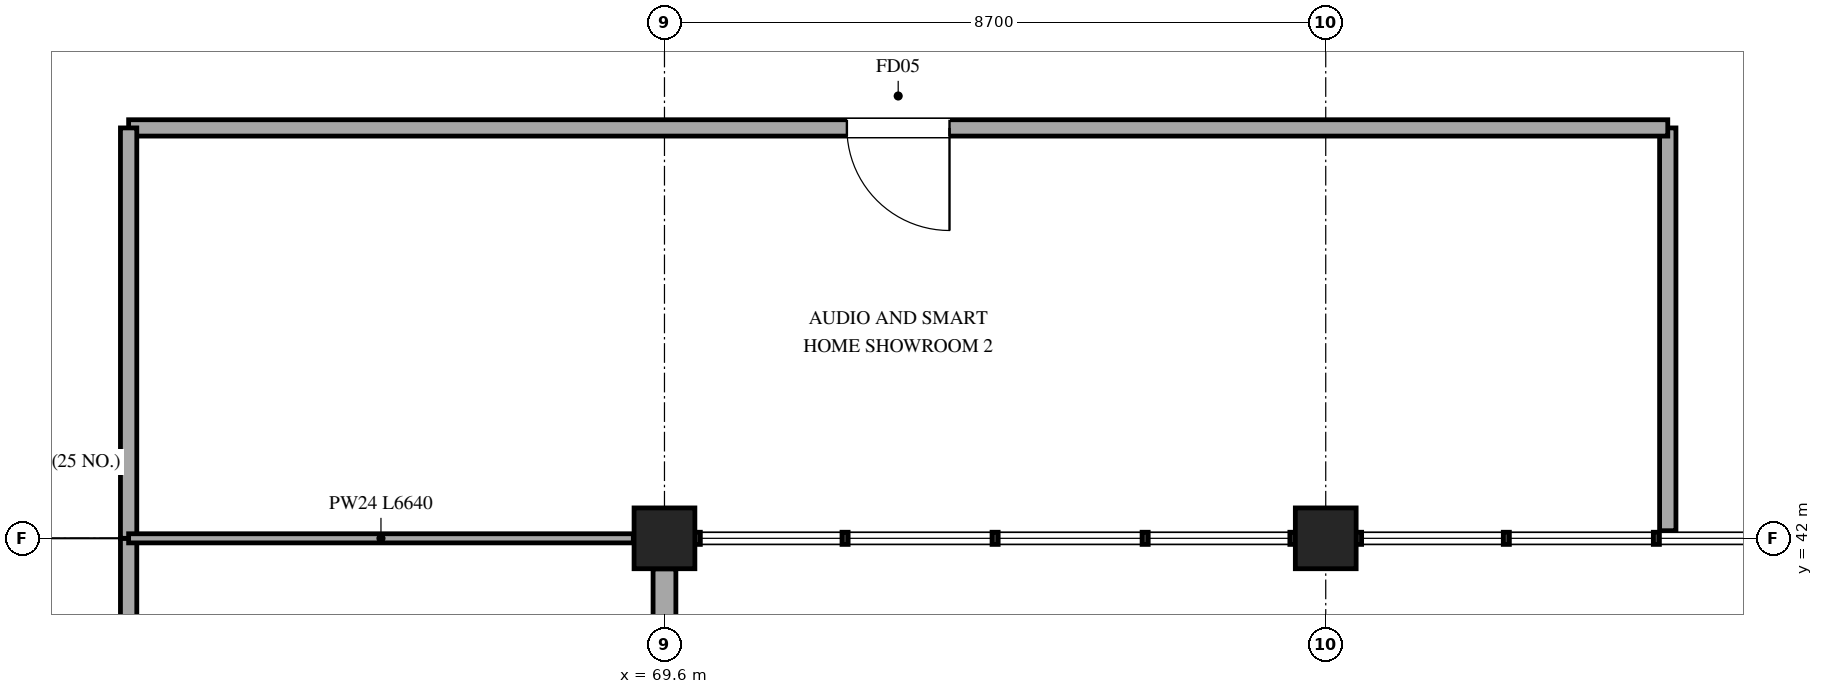
"""IFC4 building model, lengths in metres.
Left out: names, types, materials, properties, quantities, classifications, styles, units other than length and angle.
Written with IfcOpenShell. Run it as: python <this file> out.ifc"""

import sys

from ifc_helpers import new_model, si_unit, direction, frame, frame_2d, origin, origin_2d, place, context, subcontext, project, spatial, rectangle, extrude, element, fill, save


model = new_model("IFC4")
c1 = context("Model", 3, precision=1e-05, world=origin(), true_north=direction((0.0, 1.0)))
c2 = subcontext(c1, "Body", "Model", "MODEL_VIEW")
j1 = project(units=[si_unit("LENGTHUNIT", "METRE"), si_unit("PLANEANGLEUNIT", "RADIAN")], contexts=[c1])
p1 = place(None, origin())
s1 = spatial("IfcSite", under=j1, at=p1, CompositionType="ELEMENT")
p2 = place(p1, origin())
s2 = spatial("IfcBuilding", under=s1, at=p2, CompositionType="ELEMENT")
p3 = place(p2, frame((0.0, 0.0, 16.5)))
s3 = spatial("IfcBuildingStorey", under=s2, at=p3, CompositionType="ELEMENT", Elevation=16.5)
for number, where, z_axis, x_axis in (
    (1, (69.6, 42.0, 0.0), (0.0, 0.0, 1.0), (1.0, 0.0, 0.0)),
    (2, (78.3, 42.0, 0.0), (0.0, 0.0, 1.0), (1.0, 0.0, 0.0)),
):
    element("IfcColumn", number, at=place(p3, frame(where, z_axis=z_axis, x_axis=x_axis)), inside=s3, PredefinedType="COLUMN", context=c2, shape_type="SweptSolid", body=[
        extrude(rectangle(XDim=0.8, YDim=0.8, at=origin_2d()), origin(), (0.0, 0.0, 1.0), 5.1),
    ])
p4 = place(p3, frame((69.6, 41.598, 0.0), z_axis=(0.0, 0.0, 1.0), x_axis=(0.0, -1.0, 0.0)))
e3 = element("IfcWall", 3, at=p4, inside=s3, PredefinedType="STANDARD", context=c2, shape_type="SweptSolid", body=[
    extrude(rectangle(XDim=7.596, YDim=0.3, at=frame_2d((3.798, 0.0))), origin(), (0.0, 0.0, 1.0), 4.255),
])
p5 = place(p4, frame((0.745, 0.0, 0.85)))
e4 = element("IfcOpeningElement", 4, at=p5, cuts=e3, PredefinedType="OPENING", context=c2, shape_type="SweptSolid", body=[
    extrude(rectangle(XDim=1.8, YDim=1.6, at=frame_2d((0.9, 0.8))), frame((0.0, 0.16, 0.0), z_axis=(0.0, -1.0, 0.0), x_axis=(1.0, 0.0, 0.0)), (0.0, 0.0, 1.0), 0.32),
])
p6 = place(p3, frame((62.55, 42.0, 0.0), z_axis=(0.0, 0.0, 1.0), x_axis=(0.0, -1.0, 0.0)))
e5 = element("IfcWall", 5, at=p6, inside=s3, PredefinedType="PARTITIONING", context=c2, shape_type="SweptSolid", body=[
    extrude(rectangle(XDim=4.0, YDim=0.215, at=frame_2d((2.0, 0.0))), origin(), (0.0, 0.0, 1.0), 4.06),
])
p7 = place(p6, frame((1.325, 0.0, 0.0)))
e6 = element("IfcOpeningElement", 6, at=p7, cuts=e5, PredefinedType="OPENING", context=c2, shape_type="SweptSolid", body=[
    extrude(rectangle(XDim=1.35, YDim=2.2, at=frame_2d((0.675, 1.1))), frame((0.0, 0.118, 0.0), z_axis=(0.0, -1.0, 0.0), x_axis=(1.0, 0.0, 0.0)), (0.0, 0.0, 1.0), 0.235),
])
p8 = place(p3, frame((82.8, 42.1, 0.0), z_axis=(0.0, 0.0, 1.0), x_axis=(0.0, 1.0, 0.0)))
e7 = element("IfcWall", 7, at=p8, inside=s3, PredefinedType="PARTITIONING", context=c2, shape_type="SweptSolid", body=[
    extrude(rectangle(XDim=5.3, YDim=0.215, at=frame_2d((2.65, 0.0))), origin(), (0.0, 0.0, 1.0), 4.26),
])
p9 = place(p3, frame((82.8, 47.4, 0.0), z_axis=(0.0, 0.0, 1.0), x_axis=(-1.0, 0.0, 0.0)))
e8 = element("IfcWall", 8, at=p9, inside=s3, PredefinedType="PARTITIONING", context=c2, shape_type="SweptSolid", body=[
    extrude(rectangle(XDim=20.25, YDim=0.215, at=frame_2d((10.125, 0.0))), origin(), (0.0, 0.0, 1.0), 4.06),
])
p10 = place(p9, frame((9.45, 0.0, 0.0)))
e9 = element("IfcOpeningElement", 9, at=p10, cuts=e8, PredefinedType="OPENING", context=c2, shape_type="SweptSolid", body=[
    extrude(rectangle(XDim=1.35, YDim=2.2, at=frame_2d((0.675, 1.1))), frame((0.0, 0.118, 0.0), z_axis=(0.0, -1.0, 0.0), x_axis=(1.0, 0.0, 0.0)), (0.0, 0.0, 1.0), 0.235),
])
p11 = place(p3, frame((62.55, 47.4, 0.0), z_axis=(0.0, 0.0, 1.0), x_axis=(0.0, -1.0, 0.0)))
e10 = element("IfcWall", 10, at=p11, inside=s3, PredefinedType="PARTITIONING", context=c2, shape_type="SweptSolid", body=[
    extrude(rectangle(XDim=5.4, YDim=0.215, at=frame_2d((2.7, 0.0))), origin(), (0.0, 0.0, 1.0), 4.06),
])
p12 = place(p3, frame((62.55, 42.0, 0.0), z_axis=(0.0, 0.0, 1.0), x_axis=(1.0, 0.0, 0.0)))
e11 = element("IfcWall", 11, at=p12, inside=s3, PredefinedType="PARTITIONING", context=c2, shape_type="SweptSolid", body=[
    extrude(rectangle(XDim=6.64, YDim=0.12, at=frame_2d((3.32, 0.0))), origin(), (0.0, 0.0, 1.0), 4.06),
])
p13 = place(p10, origin())
e12 = element("IfcDoor", 12, at=p13, inside=s3, OperationType="SINGLE_SWING_LEFT", PredefinedType="DOOR", context=c2, shape_type="SweptSolid", body=[
    extrude(rectangle(XDim=1.35, YDim=2.2, at=frame_2d((0.675, 1.1))), frame((0.0, 0.025, 0.0), z_axis=(0.0, -1.0, 0.0), x_axis=(1.0, 0.0, 0.0)), (0.0, 0.0, 1.0), 0.05),
])
fill(e9, e12)
save(model, sys.argv[1])
